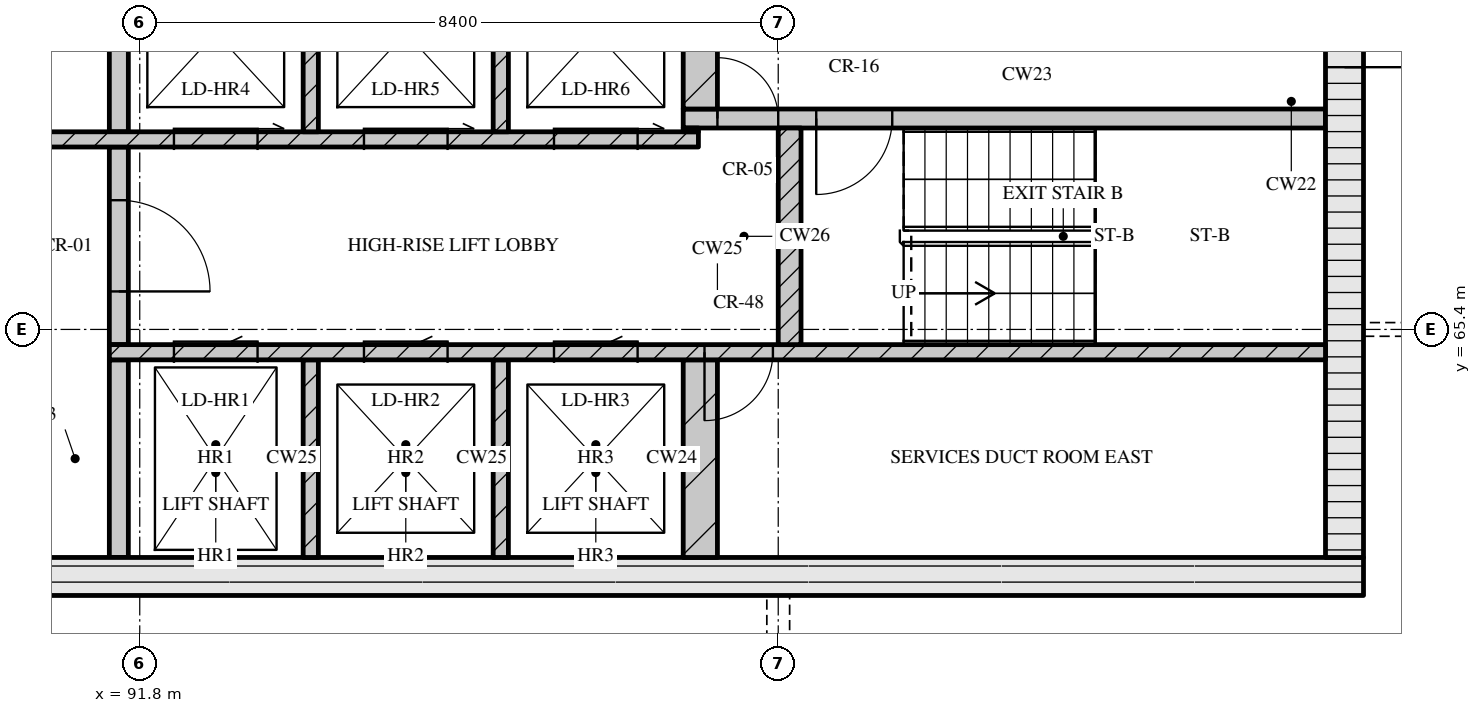
"""IFC4 building model, lengths in metres.
Left out: names, types, materials, properties, quantities, classifications, styles, units other than length and angle.
Written with IfcOpenShell. Run it as: python <this file> out.ifc"""

import sys

from ifc_helpers import new_model, si_unit, direction, frame, frame_2d, origin, place, context, subcontext, project, spatial, rectangle, extrude, element, fill, save


model = new_model("IFC4")
c1 = context("Model", 3, precision=1e-05, world=origin(), true_north=direction((0.0, 1.0)))
c2 = subcontext(c1, "Body", "Model", "MODEL_VIEW")
j1 = project(units=[si_unit("LENGTHUNIT", "METRE"), si_unit("PLANEANGLEUNIT", "RADIAN")], contexts=[c1])
p1 = place(None, origin())
s1 = spatial("IfcSite", under=j1, at=p1, CompositionType="ELEMENT")
p2 = place(p1, origin())
s2 = spatial("IfcBuilding", under=s1, at=p2, CompositionType="ELEMENT")
p3 = place(p2, frame((0.0, 0.0, 277.95)))
s3 = spatial("IfcBuildingStorey", under=s2, at=p3, CompositionType="ELEMENT", Elevation=277.95)
p4 = place(p3, frame((67.3, 62.15, 0.0), z_axis=(0.0, 0.0, 1.0), x_axis=(1.0, 0.0, 0.0)))
e1 = element("IfcWall", 1, at=p4, inside=s3, PredefinedType="SOLIDWALL", context=c2, shape_type="SweptSolid", body=[
    extrude(rectangle(XDim=40.6, YDim=0.5, at=frame_2d((20.3, 0.0))), origin(), (0.0, 0.0, 1.0), 3.32),
])
p5 = place(p4, frame((20.65, 0.0, 0.0)))
e2 = element("IfcOpeningElement", 2, at=p5, cuts=e1, PredefinedType="OPENING", context=c2, shape_type="SweptSolid", body=[
    extrude(rectangle(XDim=1.8, YDim=2.1, at=frame_2d((0.9, 1.05))), frame((0.0, 0.26, 0.0), z_axis=(0.0, -1.0, 0.0), x_axis=(1.0, 0.0, 0.0)), (0.0, 0.0, 1.0), 0.52),
])
p6 = place(p3, frame((107.65, 62.4, 0.0), z_axis=(0.0, 0.0, 1.0), x_axis=(0.0, 1.0, 0.0)))
e3 = element("IfcWall", 3, at=p6, inside=s3, PredefinedType="SOLIDWALL", context=c2, shape_type="SweptSolid", body=[
    extrude(rectangle(XDim=12.0, YDim=0.5, at=frame_2d((6.0, 0.0))), origin(), (0.0, 0.0, 1.0), 3.32),
])
p7 = place(p6, frame((6.45, 0.0, 0.0)))
e4 = element("IfcOpeningElement", 4, at=p7, cuts=e3, PredefinedType="OPENING", context=c2, shape_type="SweptSolid", body=[
    extrude(rectangle(XDim=1.2, YDim=2.1, at=frame_2d((0.6, 1.05))), frame((0.0, 0.26, 0.0), z_axis=(0.0, -1.0, 0.0), x_axis=(1.0, 0.0, 0.0)), (0.0, 0.0, 1.0), 0.52),
])
p8 = place(p3, frame((91.525, 62.4, 0.0), z_axis=(0.0, 0.0, 1.0), x_axis=(0.0, 1.0, 0.0)))
e5 = element("IfcWall", 5, at=p8, inside=s3, PredefinedType="SOLIDWALL", context=c2, shape_type="SweptSolid", body=[
    extrude(rectangle(XDim=2.6, YDim=0.25, at=frame_2d((1.3, 0.0))), origin(), (0.0, 0.0, 1.0), 3.32),
])
for number, where, z_axis, x_axis in (
    (6, (94.05, 62.4, 0.0), (0.0, 0.0, 1.0), (0.0, 1.0, 0.0)),
    (7, (96.55, 62.4, 0.0), (0.0, 0.0, 1.0), (0.0, 1.0, 0.0)),
):
    element("IfcWall", number, at=place(p3, frame(where, z_axis=z_axis, x_axis=x_axis)), inside=s3, PredefinedType="SOLIDWALL", context=c2, shape_type="SweptSolid", body=[
        extrude(rectangle(XDim=2.6, YDim=0.2, at=frame_2d((1.3, 0.0))), origin(), (0.0, 0.0, 1.0), 3.32),
    ])
p9 = place(p3, frame((99.175, 62.4, 0.0), z_axis=(0.0, 0.0, 1.0), x_axis=(0.0, 1.0, 0.0)))
e8 = element("IfcWall", 8, at=p9, inside=s3, PredefinedType="SOLIDWALL", context=c2, shape_type="SweptSolid", body=[
    extrude(rectangle(XDim=2.6, YDim=0.45, at=frame_2d((1.3, 0.0))), origin(), (0.0, 0.0, 1.0), 3.32),
])
p10 = place(p3, frame((91.4, 65.1, 0.0), z_axis=(0.0, 0.0, 1.0), x_axis=(1.0, 0.0, 0.0)))
e9 = element("IfcWall", 9, at=p10, inside=s3, PredefinedType="SOLIDWALL", context=c2, shape_type="SweptSolid", body=[
    extrude(rectangle(XDim=16.0, YDim=0.2, at=frame_2d((8.0, 0.0))), origin(), (0.0, 0.0, 1.0), 3.32),
])
p11 = place(p10, frame((0.85, 0.0, 0.0)))
e10 = element("IfcOpeningElement", 10, at=p11, cuts=e9, PredefinedType="OPENING", context=c2, shape_type="SweptSolid", body=[
    extrude(rectangle(XDim=1.1, YDim=2.1, at=frame_2d((0.55, 1.05))), frame((0.0, 0.11, 0.0), z_axis=(0.0, -1.0, 0.0), x_axis=(1.0, 0.0, 0.0)), (0.0, 0.0, 1.0), 0.22),
])
p12 = place(p10, frame((3.35, 0.0, 0.0)))
e11 = element("IfcOpeningElement", 11, at=p12, cuts=e9, PredefinedType="OPENING", context=c2, shape_type="SweptSolid", body=[
    extrude(rectangle(XDim=1.1, YDim=2.1, at=frame_2d((0.55, 1.05))), frame((0.0, 0.11, 0.0), z_axis=(0.0, -1.0, 0.0), x_axis=(1.0, 0.0, 0.0)), (0.0, 0.0, 1.0), 0.22),
])
p13 = place(p10, frame((5.85, 0.0, 0.0)))
e12 = element("IfcOpeningElement", 12, at=p13, cuts=e9, PredefinedType="OPENING", context=c2, shape_type="SweptSolid", body=[
    extrude(rectangle(XDim=1.1, YDim=2.1, at=frame_2d((0.55, 1.05))), frame((0.0, 0.11, 0.0), z_axis=(0.0, -1.0, 0.0), x_axis=(1.0, 0.0, 0.0)), (0.0, 0.0, 1.0), 0.22),
])
p14 = place(p10, frame((7.83, 0.0, 0.0)))
e13 = element("IfcOpeningElement", 13, at=p14, cuts=e9, PredefinedType="OPENING", context=c2, shape_type="SweptSolid", body=[
    extrude(rectangle(XDim=0.9, YDim=2.1, at=frame_2d((0.45, 1.05))), frame((0.0, 0.11, 0.0), z_axis=(0.0, -1.0, 0.0), x_axis=(1.0, 0.0, 0.0)), (0.0, 0.0, 1.0), 0.22),
])
p15 = place(p3, frame((91.525, 65.2, 0.0), z_axis=(0.0, 0.0, 1.0), x_axis=(0.0, 1.0, 0.0)))
e14 = element("IfcWall", 14, at=p15, inside=s3, PredefinedType="SOLIDWALL", context=c2, shape_type="SweptSolid", body=[
    extrude(rectangle(XDim=2.6, YDim=0.25, at=frame_2d((1.3, 0.0))), origin(), (0.0, 0.0, 1.0), 3.32),
])
p16 = place(p15, frame((0.7, 0.0, 0.0)))
e15 = element("IfcOpeningElement", 15, at=p16, cuts=e14, PredefinedType="OPENING", context=c2, shape_type="SweptSolid", body=[
    extrude(rectangle(XDim=1.2, YDim=2.1, at=frame_2d((0.6, 1.05))), frame((0.0, 0.135, 0.0), z_axis=(0.0, -1.0, 0.0), x_axis=(1.0, 0.0, 0.0)), (0.0, 0.0, 1.0), 0.27),
])
p17 = place(p3, frame((100.35, 65.2, 0.0), z_axis=(0.0, 0.0, 1.0), x_axis=(0.0, 1.0, 0.0)))
e16 = element("IfcWall", 16, at=p17, inside=s3, PredefinedType="SOLIDWALL", context=c2, shape_type="SweptSolid", body=[
    extrude(rectangle(XDim=2.85, YDim=0.3, at=frame_2d((1.425, 0.0))), origin(), (0.0, 0.0, 1.0), 3.32),
])
p18 = place(p3, frame((76.05, 67.9, 0.0), z_axis=(0.0, 0.0, 1.0), x_axis=(1.0, 0.0, 0.0)))
e17 = element("IfcWall", 17, at=p18, inside=s3, PredefinedType="SOLIDWALL", context=c2, shape_type="SweptSolid", body=[
    extrude(rectangle(XDim=23.1, YDim=0.2, at=frame_2d((11.55, 0.0))), origin(), (0.0, 0.0, 1.0), 3.32),
])
p19 = place(p18, frame((1.35, 0.0, 0.0)))
e18 = element("IfcOpeningElement", 18, at=p19, cuts=e17, PredefinedType="OPENING", context=c2, shape_type="SweptSolid", body=[
    extrude(rectangle(XDim=0.9, YDim=2.1, at=frame_2d((0.45, 1.05))), frame((0.0, 0.11, 0.0), z_axis=(0.0, -1.0, 0.0), x_axis=(1.0, 0.0, 0.0)), (0.0, 0.0, 1.0), 0.22),
])
p20 = place(p18, frame((5.06, 0.0, 0.0)))
e19 = element("IfcOpeningElement", 19, at=p20, cuts=e17, PredefinedType="OPENING", context=c2, shape_type="SweptSolid", body=[
    extrude(rectangle(XDim=0.9, YDim=2.1, at=frame_2d((0.45, 1.05))), frame((0.0, 0.11, 0.0), z_axis=(0.0, -1.0, 0.0), x_axis=(1.0, 0.0, 0.0)), (0.0, 0.0, 1.0), 0.22),
])
p21 = place(p18, frame((8.45, 0.0, 0.0)))
e20 = element("IfcOpeningElement", 20, at=p21, cuts=e17, PredefinedType="OPENING", context=c2, shape_type="SweptSolid", body=[
    extrude(rectangle(XDim=0.9, YDim=2.1, at=frame_2d((0.45, 1.05))), frame((0.0, 0.11, 0.0), z_axis=(0.0, -1.0, 0.0), x_axis=(1.0, 0.0, 0.0)), (0.0, 0.0, 1.0), 0.22),
])
p22 = place(p18, frame((10.91, 0.0, 0.0)))
e21 = element("IfcOpeningElement", 21, at=p22, cuts=e17, PredefinedType="OPENING", context=c2, shape_type="SweptSolid", body=[
    extrude(rectangle(XDim=0.9, YDim=2.1, at=frame_2d((0.45, 1.05))), frame((0.0, 0.11, 0.0), z_axis=(0.0, -1.0, 0.0), x_axis=(1.0, 0.0, 0.0)), (0.0, 0.0, 1.0), 0.22),
])
p23 = place(p18, frame((13.55, 0.0, 0.0)))
e22 = element("IfcOpeningElement", 22, at=p23, cuts=e17, PredefinedType="OPENING", context=c2, shape_type="SweptSolid", body=[
    extrude(rectangle(XDim=1.0, YDim=2.1, at=frame_2d((0.5, 1.05))), frame((0.0, 0.11, 0.0), z_axis=(0.0, -1.0, 0.0), x_axis=(1.0, 0.0, 0.0)), (0.0, 0.0, 1.0), 0.22),
])
p24 = place(p18, frame((16.2, 0.0, 0.0)))
e23 = element("IfcOpeningElement", 23, at=p24, cuts=e17, PredefinedType="OPENING", context=c2, shape_type="SweptSolid", body=[
    extrude(rectangle(XDim=1.1, YDim=2.1, at=frame_2d((0.55, 1.05))), frame((0.0, 0.11, 0.0), z_axis=(0.0, -1.0, 0.0), x_axis=(1.0, 0.0, 0.0)), (0.0, 0.0, 1.0), 0.22),
])
p25 = place(p18, frame((18.7, 0.0, 0.0)))
e24 = element("IfcOpeningElement", 24, at=p25, cuts=e17, PredefinedType="OPENING", context=c2, shape_type="SweptSolid", body=[
    extrude(rectangle(XDim=1.1, YDim=2.1, at=frame_2d((0.55, 1.05))), frame((0.0, 0.11, 0.0), z_axis=(0.0, -1.0, 0.0), x_axis=(1.0, 0.0, 0.0)), (0.0, 0.0, 1.0), 0.22),
])
p26 = place(p18, frame((21.2, 0.0, 0.0)))
e25 = element("IfcOpeningElement", 25, at=p26, cuts=e17, PredefinedType="OPENING", context=c2, shape_type="SweptSolid", body=[
    extrude(rectangle(XDim=1.1, YDim=2.1, at=frame_2d((0.55, 1.05))), frame((0.0, 0.11, 0.0), z_axis=(0.0, -1.0, 0.0), x_axis=(1.0, 0.0, 0.0)), (0.0, 0.0, 1.0), 0.22),
])
p27 = place(p3, frame((91.525, 68.0, 0.0), z_axis=(0.0, 0.0, 1.0), x_axis=(0.0, 1.0, 0.0)))
e26 = element("IfcWall", 26, at=p27, inside=s3, PredefinedType="SOLIDWALL", context=c2, shape_type="SweptSolid", body=[
    extrude(rectangle(XDim=2.6, YDim=0.25, at=frame_2d((1.3, 0.0))), origin(), (0.0, 0.0, 1.0), 3.32),
])
for number, where, z_axis, x_axis in (
    (27, (94.05, 68.0, 0.0), (0.0, 0.0, 1.0), (0.0, 1.0, 0.0)),
    (28, (96.55, 68.0, 0.0), (0.0, 0.0, 1.0), (0.0, 1.0, 0.0)),
):
    element("IfcWall", number, at=place(p3, frame(where, z_axis=z_axis, x_axis=x_axis)), inside=s3, PredefinedType="SOLIDWALL", context=c2, shape_type="SweptSolid", body=[
        extrude(rectangle(XDim=2.6, YDim=0.2, at=frame_2d((1.3, 0.0))), origin(), (0.0, 0.0, 1.0), 3.32),
    ])
p28 = place(p3, frame((98.95, 68.025, 0.0), z_axis=(0.0, 0.0, 1.0), x_axis=(1.0, 0.0, 0.0)))
e29 = element("IfcWall", 29, at=p28, inside=s3, PredefinedType="SOLIDWALL", context=c2, shape_type="SweptSolid", body=[
    extrude(rectangle(XDim=0.2, YDim=0.05, at=frame_2d((0.1, 0.0))), origin(), (0.0, 0.0, 1.0), 3.32),
])
p29 = place(p3, frame((98.95, 68.175, 0.0), z_axis=(0.0, 0.0, 1.0), x_axis=(1.0, 0.0, 0.0)))
e30 = element("IfcWall", 30, at=p29, inside=s3, PredefinedType="SOLIDWALL", context=c2, shape_type="SweptSolid", body=[
    extrude(rectangle(XDim=8.45, YDim=0.25, at=frame_2d((4.225, 0.0))), origin(), (0.0, 0.0, 1.0), 3.32),
])
p30 = place(p29, frame((0.45, 0.0, 0.0)))
e31 = element("IfcOpeningElement", 31, at=p30, cuts=e30, PredefinedType="OPENING", context=c2, shape_type="SweptSolid", body=[
    extrude(rectangle(XDim=0.8, YDim=2.1, at=frame_2d((0.4, 1.05))), frame((0.0, 0.135, 0.0), z_axis=(0.0, -1.0, 0.0), x_axis=(1.0, 0.0, 0.0)), (0.0, 0.0, 1.0), 0.27),
])
p31 = place(p29, frame((1.75, 0.0, 0.0)))
e32 = element("IfcOpeningElement", 32, at=p31, cuts=e30, PredefinedType="OPENING", context=c2, shape_type="SweptSolid", body=[
    extrude(rectangle(XDim=1.0, YDim=2.1, at=frame_2d((0.5, 1.05))), frame((0.0, 0.135, 0.0), z_axis=(0.0, -1.0, 0.0), x_axis=(1.0, 0.0, 0.0)), (0.0, 0.0, 1.0), 0.27),
])
p32 = place(p3, frame((99.175, 68.3, 0.0), z_axis=(0.0, 0.0, 1.0), x_axis=(0.0, 1.0, 0.0)))
e33 = element("IfcWall", 33, at=p32, inside=s3, PredefinedType="SOLIDWALL", context=c2, shape_type="SweptSolid", body=[
    extrude(rectangle(XDim=2.3, YDim=0.45, at=frame_2d((1.15, 0.0))), origin(), (0.0, 0.0, 1.0), 3.32),
])
p33 = place(p11, origin())
e34 = element("IfcDoor", 34, at=p33, inside=s3, OperationType="SLIDING_TO_LEFT", PredefinedType="DOOR", context=c2, shape_type="SweptSolid", body=[
    extrude(rectangle(XDim=1.1, YDim=2.1, at=frame_2d((0.55, 1.05))), frame((0.0, 0.025, 0.0), z_axis=(0.0, -1.0, 0.0), x_axis=(1.0, 0.0, 0.0)), (0.0, 0.0, 1.0), 0.05),
])
fill(e10, e34)
p34 = place(p12, origin())
e35 = element("IfcDoor", 35, at=p34, inside=s3, OperationType="SLIDING_TO_LEFT", PredefinedType="DOOR", context=c2, shape_type="SweptSolid", body=[
    extrude(rectangle(XDim=1.1, YDim=2.1, at=frame_2d((0.55, 1.05))), frame((0.0, 0.025, 0.0), z_axis=(0.0, -1.0, 0.0), x_axis=(1.0, 0.0, 0.0)), (0.0, 0.0, 1.0), 0.05),
])
fill(e11, e35)
p35 = place(p13, origin())
e36 = element("IfcDoor", 36, at=p35, inside=s3, OperationType="SLIDING_TO_LEFT", PredefinedType="DOOR", context=c2, shape_type="SweptSolid", body=[
    extrude(rectangle(XDim=1.1, YDim=2.1, at=frame_2d((0.55, 1.05))), frame((0.0, 0.025, 0.0), z_axis=(0.0, -1.0, 0.0), x_axis=(1.0, 0.0, 0.0)), (0.0, 0.0, 1.0), 0.05),
])
fill(e12, e36)
p36 = place(p14, origin())
e37 = element("IfcDoor", 37, at=p36, inside=s3, OperationType="SINGLE_SWING_RIGHT", PredefinedType="DOOR", context=c2, shape_type="SweptSolid", body=[
    extrude(rectangle(XDim=0.9, YDim=2.1, at=frame_2d((0.45, 1.05))), frame((0.0, 0.025, 0.0), z_axis=(0.0, -1.0, 0.0), x_axis=(1.0, 0.0, 0.0)), (0.0, 0.0, 1.0), 0.05),
])
fill(e13, e37)
p37 = place(p16, origin())
e38 = element("IfcDoor", 38, at=p37, inside=s3, OperationType="SINGLE_SWING_RIGHT", PredefinedType="DOOR", context=c2, shape_type="SweptSolid", body=[
    extrude(rectangle(XDim=1.2, YDim=2.1, at=frame_2d((0.6, 1.05))), frame((0.0, 0.025, 0.0), z_axis=(0.0, -1.0, 0.0), x_axis=(1.0, 0.0, 0.0)), (0.0, 0.0, 1.0), 0.05),
])
fill(e15, e38)
p38 = place(p24, origin())
e39 = element("IfcDoor", 39, at=p38, inside=s3, OperationType="SLIDING_TO_RIGHT", PredefinedType="DOOR", context=c2, shape_type="SweptSolid", body=[
    extrude(rectangle(XDim=1.1, YDim=2.1, at=frame_2d((0.55, 1.05))), frame((0.0, 0.025, 0.0), z_axis=(0.0, -1.0, 0.0), x_axis=(1.0, 0.0, 0.0)), (0.0, 0.0, 1.0), 0.05),
])
fill(e23, e39)
p39 = place(p25, origin())
e40 = element("IfcDoor", 40, at=p39, inside=s3, OperationType="SLIDING_TO_RIGHT", PredefinedType="DOOR", context=c2, shape_type="SweptSolid", body=[
    extrude(rectangle(XDim=1.1, YDim=2.1, at=frame_2d((0.55, 1.05))), frame((0.0, 0.025, 0.0), z_axis=(0.0, -1.0, 0.0), x_axis=(1.0, 0.0, 0.0)), (0.0, 0.0, 1.0), 0.05),
])
fill(e24, e40)
p40 = place(p26, origin())
e41 = element("IfcDoor", 41, at=p40, inside=s3, OperationType="SLIDING_TO_RIGHT", PredefinedType="DOOR", context=c2, shape_type="SweptSolid", body=[
    extrude(rectangle(XDim=1.1, YDim=2.1, at=frame_2d((0.55, 1.05))), frame((0.0, 0.025, 0.0), z_axis=(0.0, -1.0, 0.0), x_axis=(1.0, 0.0, 0.0)), (0.0, 0.0, 1.0), 0.05),
])
fill(e25, e41)
p41 = place(p30, origin())
e42 = element("IfcDoor", 42, at=p41, inside=s3, OperationType="SINGLE_SWING_LEFT", PredefinedType="DOOR", context=c2, shape_type="SweptSolid", body=[
    extrude(rectangle(XDim=0.8, YDim=2.1, at=frame_2d((0.4, 1.05))), frame((0.0, 0.025, 0.0), z_axis=(0.0, -1.0, 0.0), x_axis=(1.0, 0.0, 0.0)), (0.0, 0.0, 1.0), 0.05),
])
fill(e31, e42)
p42 = place(p31, origin())
e43 = element("IfcDoor", 43, at=p42, inside=s3, OperationType="SINGLE_SWING_RIGHT", PredefinedType="DOOR", context=c2, shape_type="SweptSolid", body=[
    extrude(rectangle(XDim=1.0, YDim=2.1, at=frame_2d((0.5, 1.05))), frame((0.0, 0.025, 0.0), z_axis=(0.0, -1.0, 0.0), x_axis=(1.0, 0.0, 0.0)), (0.0, 0.0, 1.0), 0.05),
])
fill(e32, e43)
p43 = place(p7, origin())
e44 = element("IfcDoor", 44, at=p43, inside=s3, OperationType="SINGLE_SWING_RIGHT", PredefinedType="DOOR", context=c2, shape_type="SweptSolid", body=[
    extrude(rectangle(XDim=1.2, YDim=2.1, at=frame_2d((0.6, 1.05))), frame((0.0, 0.025, 0.0), z_axis=(0.0, -1.0, 0.0), x_axis=(1.0, 0.0, 0.0)), (0.0, 0.0, 1.0), 0.05),
])
fill(e4, e44)
save(model, sys.argv[1])
